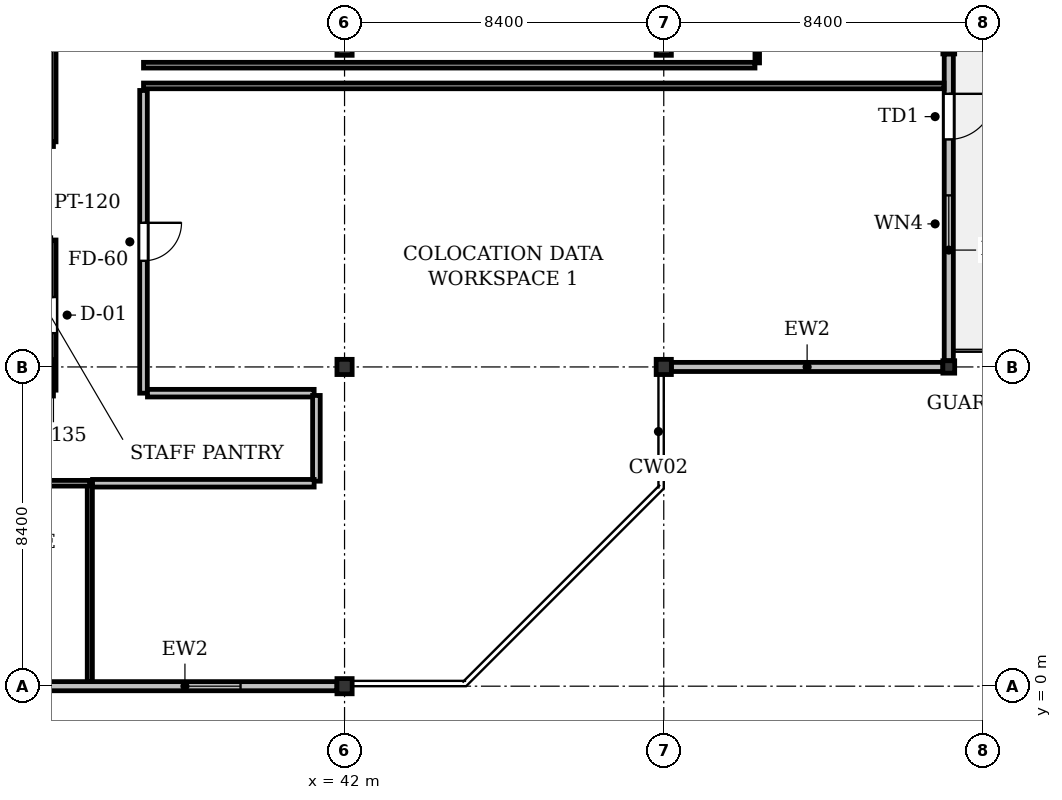
"""IFC4 building model, lengths in metres.
Left out: names, types, materials, properties, quantities, classifications, styles, units other than length and angle.
Written with IfcOpenShell. Run it as: python <this file> out.ifc"""

import sys

from ifc_helpers import new_model, si_unit, direction, frame, frame_2d, origin, origin_2d, place, context, subcontext, project, spatial, rectangle, i_section, extrude, element, fill, save


model = new_model("IFC4")
c1 = context("Model", 3, precision=1e-05, world=origin(), true_north=direction((0.0, 1.0)))
c2 = subcontext(c1, "Body", "Model", "MODEL_VIEW")
j1 = project(units=[si_unit("LENGTHUNIT", "METRE"), si_unit("PLANEANGLEUNIT", "RADIAN")], contexts=[c1])
p1 = place(None, origin())
s1 = spatial("IfcSite", under=j1, at=p1, CompositionType="ELEMENT")
p2 = place(p1, origin())
s2 = spatial("IfcBuilding", under=s1, at=p2, CompositionType="ELEMENT")
p3 = place(p2, frame((0.0, 0.0, 109.0)))
s3 = spatial("IfcBuildingStorey", under=s2, at=p3, CompositionType="ELEMENT", Elevation=109.0)
for number, where, z_axis, x_axis in (
    (1, (42.0, 0.0, 0.0), (0.0, 0.0, 1.0), (1.0, 0.0, 0.0)),
    (2, (42.0, 8.4, 0.0), (0.0, 0.0, 1.0), (1.0, 0.0, 0.0)),
    (3, (42.0, 16.8, 0.0), (0.0, 0.0, 1.0), (1.0, 0.0, 0.0)),
    (4, (50.4, 8.4, 0.0), (0.0, 0.0, 1.0), (1.0, 0.0, 0.0)),
    (5, (50.4, 16.8, 0.0), (0.0, 0.0, 1.0), (1.0, 0.0, 0.0)),
):
    element("IfcColumn", number, at=place(p3, frame(where, z_axis=z_axis, x_axis=x_axis)), inside=s3, PredefinedType="COLUMN", context=c2, shape_type="SweptSolid", body=[
        extrude(i_section(OverallWidth=0.4, OverallDepth=0.4, WebThickness=0.025, FlangeThickness=0.04, at=origin_2d()), origin(), (0.0, 0.0, 1.0), 4.1),
    ])
for number, where, z_axis, x_axis in (
    (6, (57.9, 8.4, 0.0), (0.0, 0.0, 1.0), (1.0, 0.0, 0.0)),
    (7, (57.9, 16.8, 0.0), (0.0, 0.0, 1.0), (1.0, 0.0, 0.0)),
):
    element("IfcColumn", number, at=place(p3, frame(where, z_axis=z_axis, x_axis=x_axis)), inside=s3, PredefinedType="COLUMN", context=c2, shape_type="SweptSolid", body=[
        extrude(i_section(OverallWidth=0.311, OverallDepth=0.327, WebThickness=0.016, FlangeThickness=0.025, FilletRadius=0.017, at=origin_2d()), origin(), (0.0, 0.0, 1.0), 4.1),
    ])
p4 = place(p3, frame((57.9, 16.636, 0.0), z_axis=(0.0, 0.0, 1.0), x_axis=(0.0, -1.0, 0.0)))
e8 = element("IfcWall", 8, at=p4, inside=s3, PredefinedType="STANDARD", context=c2, shape_type="SweptSolid", body=[
    extrude(rectangle(XDim=8.073, YDim=0.24, at=frame_2d((4.037, 0.0))), origin(), (0.0, 0.0, 1.0), 3.347),
])
p5 = place(p4, frame((1.05, 0.0, 0.0)))
e9 = element("IfcOpeningElement", 9, at=p5, cuts=e8, PredefinedType="OPENING", context=c2, shape_type="SweptSolid", body=[
    extrude(rectangle(XDim=1.2, YDim=2.2, at=frame_2d((0.6, 1.1))), frame((0.0, 0.13, 0.0), z_axis=(0.0, -1.0, 0.0), x_axis=(1.0, 0.0, 0.0)), (0.0, 0.0, 1.0), 0.26),
])
p6 = place(p4, frame((3.722, 0.0, 0.9)))
e10 = element("IfcOpeningElement", 10, at=p6, cuts=e8, PredefinedType="OPENING", context=c2, shape_type="SweptSolid", body=[
    extrude(rectangle(XDim=1.5, YDim=1.6, at=frame_2d((0.75, 0.8))), frame((0.0, 0.13, 0.0), z_axis=(0.0, -1.0, 0.0), x_axis=(1.0, 0.0, 0.0)), (0.0, 0.0, 1.0), 0.26),
])
p7 = place(p3, frame((57.744, 8.4, 0.0), z_axis=(0.0, 0.0, 1.0), x_axis=(-1.0, 0.0, 0.0)))
e11 = element("IfcWall", 11, at=p7, inside=s3, PredefinedType="STANDARD", context=c2, shape_type="SweptSolid", body=[
    extrude(rectangle(XDim=7.144, YDim=0.24, at=frame_2d((3.572, 0.0))), origin(), (0.0, 0.0, 1.0), 2.84),
])
p8 = place(p3, frame((41.8, 0.0, 0.0), z_axis=(0.0, 0.0, 1.0), x_axis=(-1.0, 0.0, 0.0)))
e12 = element("IfcWall", 12, at=p8, inside=s3, PredefinedType="STANDARD", context=c2, shape_type="SweptSolid", body=[
    extrude(rectangle(XDim=8.0, YDim=0.24, at=frame_2d((4.0, 0.0))), origin(), (0.0, 0.0, 1.0), 3.75),
])
p9 = place(p8, frame((2.537, 0.0, 0.9)))
e13 = element("IfcOpeningElement", 13, at=p9, cuts=e12, PredefinedType="OPENING", context=c2, shape_type="SweptSolid", body=[
    extrude(rectangle(XDim=1.5, YDim=1.6, at=frame_2d((0.75, 0.8))), frame((0.0, 0.13, 0.0), z_axis=(0.0, -1.0, 0.0), x_axis=(1.0, 0.0, 0.0)), (0.0, 0.0, 1.0), 0.26),
])
p10 = place(p3, frame((25.806, 7.71, 0.0), z_axis=(0.0, 0.0, 1.0), x_axis=(1.0, 0.0, 0.0)))
e14 = element("IfcWall", 14, at=p10, inside=s3, PredefinedType="PARTITIONING", context=c2, shape_type="SweptSolid", body=[
    extrude(rectangle(XDim=8.534, YDim=0.15, at=frame_2d((4.267, 0.0))), origin(), (0.0, 0.0, 1.0), 3.222),
])
p11 = place(p3, frame((34.34, 7.789, 0.0), z_axis=(0.0, 0.0, 1.0), x_axis=(0.0, 1.0, 0.0)))
e15 = element("IfcWall", 15, at=p11, inside=s3, PredefinedType="PARTITIONING", context=c2, shape_type="SweptSolid", body=[
    extrude(rectangle(XDim=3.951, YDim=0.135, at=frame_2d((1.976, 0.0))), origin(), (0.0, 0.0, 1.0), 3.217),
])
p12 = place(p11, frame((1.5, 0.0, 0.0)))
e16 = element("IfcOpeningElement", 16, at=p12, cuts=e15, PredefinedType="OPENING", context=c2, shape_type="SweptSolid", body=[
    extrude(rectangle(XDim=0.95, YDim=2.15, at=frame_2d((0.475, 1.075))), frame((0.0, 0.077, 0.0), z_axis=(0.0, -1.0, 0.0), x_axis=(1.0, 0.0, 0.0)), (0.0, 0.0, 1.0), 0.155),
])
p13 = place(p3, frame((52.8, 16.34, 0.0), z_axis=(0.0, 0.0, 1.0), x_axis=(-1.0, 0.0, 0.0)))
e17 = element("IfcWall", 17, at=p13, inside=s3, PredefinedType="PARTITIONING", context=c2, shape_type="SweptSolid", body=[
    extrude(rectangle(XDim=16.09, YDim=0.15, at=frame_2d((8.045, 0.0))), origin(), (0.0, 0.0, 1.0), 3.222),
])
p14 = place(p3, frame((36.71, 15.795, 0.0), z_axis=(0.0, 0.0, 1.0), x_axis=(1.0, 0.0, 0.0)))
e18 = element("IfcWall", 18, at=p14, inside=s3, PredefinedType="PARTITIONING", context=c2, shape_type="SweptSolid", body=[
    extrude(rectangle(XDim=21.066, YDim=0.15, at=frame_2d((10.533, 0.0))), origin(), (0.0, 0.0, 1.0), 3.222),
])
p15 = place(p3, frame((52.86, 18.7, 0.0), z_axis=(0.0, 0.0, 1.0), x_axis=(0.0, -1.0, 0.0)))
e19 = element("IfcWall", 19, at=p15, inside=s3, PredefinedType="PARTITIONING", context=c2, shape_type="SweptSolid", body=[
    extrude(rectangle(XDim=2.3, YDim=0.12, at=frame_2d((1.15, 0.0))), origin(), (0.0, 0.0, 1.0), 2.84),
])
p16 = place(p3, frame((35.297, 0.124, 0.0), z_axis=(0.0, 0.0, 1.0), x_axis=(0.0, 1.0, 0.0)))
e20 = element("IfcWall", 20, at=p16, inside=s3, PredefinedType="PARTITIONING", context=c2, shape_type="SweptSolid", body=[
    extrude(rectangle(XDim=5.216, YDim=0.135, at=frame_2d((2.608, 0.0))), origin(), (0.0, 0.0, 1.0), 3.75),
])
p17 = place(p3, frame((35.297, 5.34, 0.0), z_axis=(0.0, 0.0, 1.0), x_axis=(-0.999999999967, 8.164398e-06, 0.0)))
e21 = element("IfcWall", 21, at=p17, inside=s3, PredefinedType="PARTITIONING", context=c2, shape_type="SweptSolid", body=[
    extrude(rectangle(XDim=29.903, YDim=0.15, at=frame_2d((14.952, 0.0))), origin(), (0.0, 0.0, 1.0), 3.222),
])
p18 = place(p17, frame((14.477, 0.0, 0.0)))
e22 = element("IfcOpeningElement", 22, at=p18, cuts=e21, PredefinedType="OPENING", context=c2, shape_type="SweptSolid", body=[
    extrude(rectangle(XDim=0.95, YDim=2.15, at=frame_2d((0.475, 1.075))), frame((0.0, 0.085, 0.0), z_axis=(0.0, -1.0, 0.0), x_axis=(1.0, 0.0, 0.0)), (0.0, 0.0, 1.0), 0.17),
])
p19 = place(p3, frame((32.804, 14.26, 0.0), z_axis=(0.0, 0.0, 1.0), x_axis=(1.0, 0.0, 0.0)))
e23 = element("IfcWall", 23, at=p19, inside=s3, PredefinedType="PARTITIONING", context=c2, shape_type="SweptSolid", body=[
    extrude(rectangle(XDim=1.536, YDim=0.12, at=frame_2d((0.768, 0.0))), origin(), (0.0, 0.0, 1.0), 3.222),
])
p20 = place(p3, frame((34.34, 14.324, 0.0), z_axis=(0.0, 0.0, 1.0), x_axis=(0.0, 1.0, 0.0)))
e24 = element("IfcWall", 24, at=p20, inside=s3, PredefinedType="PARTITIONING", context=c2, shape_type="SweptSolid", body=[
    extrude(rectangle(XDim=3.216, YDim=0.135, at=frame_2d((1.608, 0.0))), origin(), (0.0, 0.0, 1.0), 3.217),
])
p21 = place(p3, frame((36.71, 15.675, 0.0), z_axis=(0.0, 0.0, 1.0), x_axis=(0.0, -1.0, 0.0)))
e25 = element("IfcWall", 25, at=p21, inside=s3, PredefinedType="PARTITIONING", context=c2, shape_type="SweptSolid", body=[
    extrude(rectangle(XDim=7.965, YDim=0.2, at=frame_2d((3.982, 0.0))), origin(), (0.0, 0.0, 1.0), 3.217),
])
p22 = place(p21, frame((3.483, 0.0, 0.0)))
e26 = element("IfcOpeningElement", 26, at=p22, cuts=e25, PredefinedType="OPENING", context=c2, shape_type="SweptSolid", body=[
    extrude(rectangle(XDim=1.0, YDim=2.15, at=frame_2d((0.5, 1.075))), frame((0.0, 0.11, 0.0), z_axis=(0.0, -1.0, 0.0), x_axis=(1.0, 0.0, 0.0)), (0.0, 0.0, 1.0), 0.22),
])
p23 = place(p3, frame((36.814, 7.71, 0.0), z_axis=(0.0, 0.0, 1.0), x_axis=(1.0, 0.0, 0.0)))
e27 = element("IfcWall", 27, at=p23, inside=s3, PredefinedType="PARTITIONING", context=c2, shape_type="SweptSolid", body=[
    extrude(rectangle(XDim=4.386, YDim=0.2, at=frame_2d((2.193, 0.0))), origin(), (0.0, 0.0, 1.0), 3.75),
])
p24 = place(p3, frame((41.26, 7.65, 0.0), z_axis=(0.0, 0.0, 1.0), x_axis=(-0.000108225108, -0.999999994144, 0.0)))
e28 = element("IfcWall", 28, at=p24, inside=s3, PredefinedType="PARTITIONING", context=c2, shape_type="SweptSolid", body=[
    extrude(rectangle(XDim=2.256, YDim=0.2, at=frame_2d((1.128, 0.0))), origin(), (0.0, 0.0, 1.0), 3.75),
])
p25 = place(p3, frame((41.2, 5.34, 0.0), z_axis=(0.0, 0.0, 1.0), x_axis=(-1.0, 0.0, 0.0)))
e29 = element("IfcWall", 29, at=p25, inside=s3, PredefinedType="PARTITIONING", context=c2, shape_type="SweptSolid", body=[
    extrude(rectangle(XDim=5.832, YDim=0.2, at=frame_2d((2.916, 0.0))), origin(), (0.0, 0.0, 1.0), 3.75),
])
p26 = place(p5, origin())
e30 = element("IfcDoor", 30, at=p26, inside=s3, OperationType="SINGLE_SWING_LEFT", PredefinedType="DOOR", context=c2, shape_type="SweptSolid", body=[
    extrude(rectangle(XDim=1.2, YDim=2.2, at=frame_2d((0.6, 1.1))), frame((0.0, 0.025, 0.0), z_axis=(0.0, -1.0, 0.0), x_axis=(1.0, 0.0, 0.0)), (0.0, 0.0, 1.0), 0.05),
])
fill(e9, e30)
p27 = place(p6, origin())
e31 = element("IfcWindow", 31, at=p27, inside=s3, PartitioningType="SINGLE_PANEL", PredefinedType="WINDOW", context=c2, shape_type="SweptSolid", body=[
    extrude(rectangle(XDim=1.5, YDim=1.6, at=frame_2d((0.75, 0.8))), frame((0.0, 0.03, 0.0), z_axis=(0.0, -1.0, 0.0), x_axis=(1.0, 0.0, 0.0)), (0.0, 0.0, 1.0), 0.06),
])
fill(e10, e31)
p28 = place(p9, origin())
e32 = element("IfcWindow", 32, at=p28, inside=s3, PartitioningType="SINGLE_PANEL", PredefinedType="WINDOW", context=c2, shape_type="SweptSolid", body=[
    extrude(rectangle(XDim=1.5, YDim=1.6, at=frame_2d((0.75, 0.8))), frame((0.0, 0.03, 0.0), z_axis=(0.0, -1.0, 0.0), x_axis=(1.0, 0.0, 0.0)), (0.0, 0.0, 1.0), 0.06),
])
fill(e13, e32)
p29 = place(p12, origin())
e33 = element("IfcDoor", 33, at=p29, inside=s3, OperationType="SINGLE_SWING_RIGHT", PredefinedType="DOOR", context=c2, shape_type="SweptSolid", body=[
    extrude(rectangle(XDim=0.95, YDim=2.15, at=frame_2d((0.475, 1.075))), frame((0.0, 0.025, 0.0), z_axis=(0.0, -1.0, 0.0), x_axis=(1.0, 0.0, 0.0)), (0.0, 0.0, 1.0), 0.05),
])
fill(e16, e33)
p30 = place(p22, origin())
e34 = element("IfcDoor", 34, at=p30, inside=s3, OperationType="SINGLE_SWING_LEFT", PredefinedType="DOOR", context=c2, shape_type="SweptSolid", body=[
    extrude(rectangle(XDim=1.0, YDim=2.15, at=frame_2d((0.5, 1.075))), frame((0.0, 0.025, 0.0), z_axis=(0.0, -1.0, 0.0), x_axis=(1.0, 0.0, 0.0)), (0.0, 0.0, 1.0), 0.05),
])
fill(e26, e34)
save(model, sys.argv[1])
